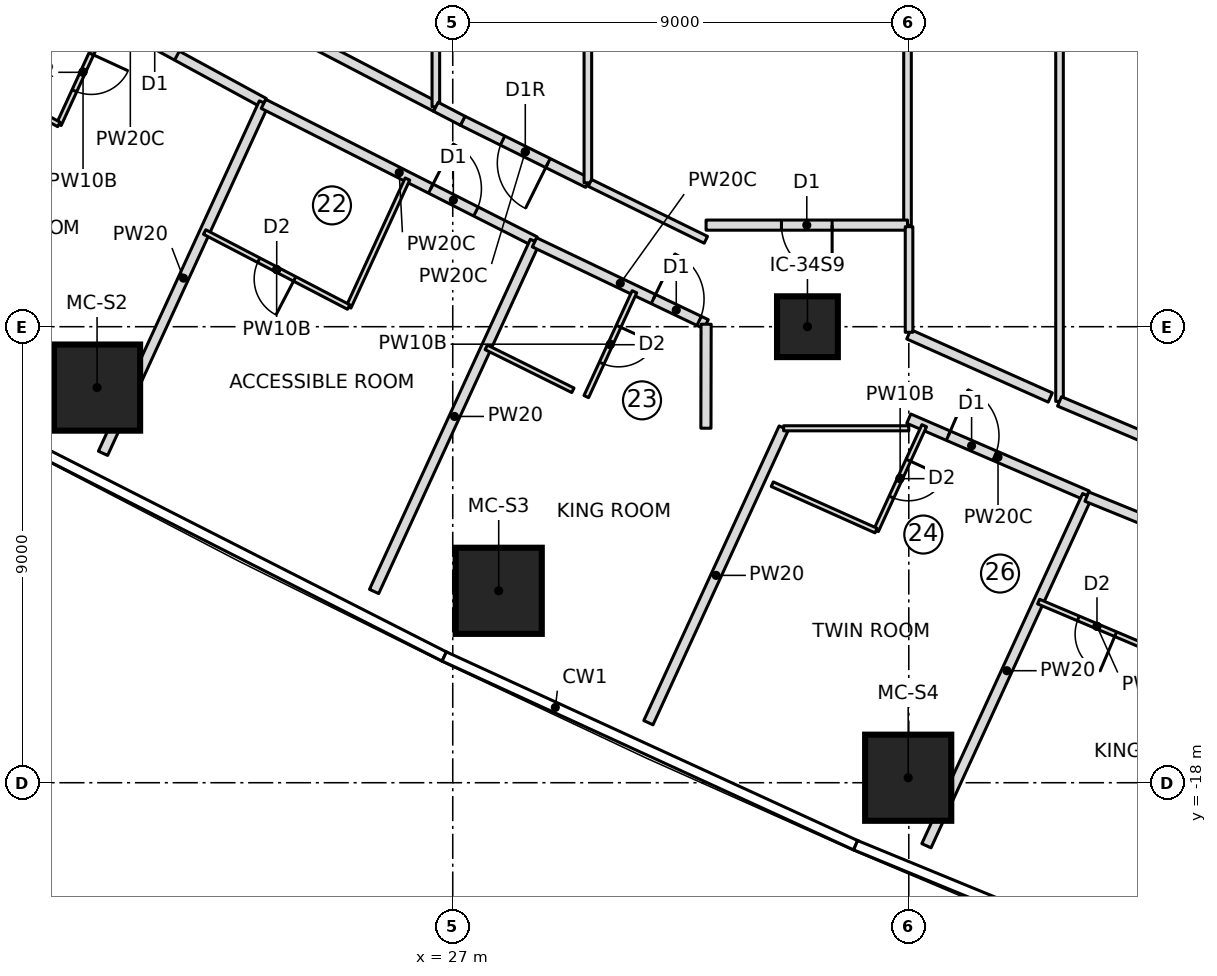
"""IFC4 building model, lengths in metres.
Left out: names, types, materials, properties, quantities, classifications, styles, units other than length and angle.
Written with IfcOpenShell. Run it as: python <this file> out.ifc"""

import sys

from ifc_helpers import new_model, si_unit, direction, frame, frame_2d, origin, origin_2d, place, context, subcontext, project, spatial, rectangle, extrude, element, fill, save


model = new_model("IFC4")
c1 = context("Model", 3, precision=1e-05, world=origin(), true_north=direction((0.0, 1.0)))
c2 = subcontext(c1, "Body", "Model", "MODEL_VIEW")
j1 = project(units=[si_unit("LENGTHUNIT", "METRE"), si_unit("PLANEANGLEUNIT", "RADIAN")], contexts=[c1])
p1 = place(None, origin())
s1 = spatial("IfcSite", under=j1, at=p1, CompositionType="ELEMENT")
p2 = place(p1, origin())
s2 = spatial("IfcBuilding", under=s1, at=p2, CompositionType="ELEMENT")
p3 = place(p2, frame((0.0, 0.0, 109.75)))
s3 = spatial("IfcBuildingStorey", under=s2, at=p3, CompositionType="ELEMENT", Elevation=109.75)
for number, where, z_axis, x_axis in (
    (1, (19.981, -10.202, 0.0), (0.0, 0.0, 1.0), (1.0, 0.0, 0.0)),
    (2, (27.907, -14.212, 0.0), (0.0, 0.0, 1.0), (1.0, 0.0, 0.0)),
    (3, (35.988, -17.902, 0.0), (0.0, 0.0, 1.0), (1.0, 0.0, 0.0)),
):
    element("IfcColumn", number, at=place(p3, frame(where, z_axis=z_axis, x_axis=x_axis)), inside=s3, PredefinedType="COLUMN", context=c2, shape_type="SweptSolid", body=[
        extrude(rectangle(XDim=1.7, YDim=1.7, at=origin_2d()), origin(), (0.0, 0.0, 1.0), 3.55),
    ])
p4 = place(p3, frame((34.0, -9.0, 0.0), z_axis=(0.0, 0.0, 1.0), x_axis=(1.0, 0.0, 0.0)))
e4 = element("IfcColumn", 4, at=p4, inside=s3, PredefinedType="COLUMN", context=c2, shape_type="SweptSolid", body=[
    extrude(rectangle(XDim=1.2, YDim=1.2, at=origin_2d()), origin(), (0.0, 0.0, 1.0), 3.55),
])
p5 = place(p3, frame((18.0, -1.715, 0.0), z_axis=(0.0, 0.0, 1.0), x_axis=(0.878415628048, -0.477897462225, 0.0)))
e5 = element("IfcWall", 5, at=p5, inside=s3, PredefinedType="PARTITIONING", context=c2, shape_type="SweptSolid", body=[
    extrude(rectangle(XDim=6.004, YDim=0.2, at=frame_2d((3.002, 0.0))), origin(), (0.0, 0.0, 1.0), 3.25),
])
p6 = place(p5, frame((3.05, 0.0, 0.0)))
e6 = element("IfcOpeningElement", 6, at=p6, cuts=e5, PredefinedType="OPENING", context=c2, shape_type="SweptSolid", body=[
    extrude(rectangle(XDim=1.0, YDim=2.1, at=frame_2d((0.5, 1.05))), frame((0.0, 0.11, 0.0), z_axis=(0.0, -1.0, 0.0), x_axis=(1.0, 0.0, 0.0)), (0.0, 0.0, 1.0), 0.22),
])
p7 = place(p3, frame((20.18, -2.934, 0.0), z_axis=(0.0, 0.0, 1.0), x_axis=(-0.417450047292, -0.908699872354, 0.0)))
e7 = element("IfcWall", 7, at=p7, inside=s3, PredefinedType="PARTITIONING", context=c2, shape_type="SweptSolid", body=[
    extrude(rectangle(XDim=2.283, YDim=0.1, at=frame_2d((1.141, 0.0))), origin(), (0.0, 0.0, 1.0), 3.25),
])
p8 = place(p7, frame((0.75, 0.0, 0.0)))
e8 = element("IfcOpeningElement", 8, at=p8, cuts=e7, PredefinedType="OPENING", context=c2, shape_type="SweptSolid", body=[
    extrude(rectangle(XDim=0.8, YDim=2.1, at=frame_2d((0.4, 1.05))), frame((0.0, 0.06, 0.0), z_axis=(0.0, -1.0, 0.0), x_axis=(1.0, 0.0, 0.0)), (0.0, 0.0, 1.0), 0.12),
])
p9 = place(p3, frame((19.228, -5.008, 0.0), z_axis=(0.0, 0.0, 1.0), x_axis=(-0.877424481957, 0.479714788663, 0.0)))
e9 = element("IfcWall", 9, at=p9, inside=s3, PredefinedType="PARTITIONING", context=c2, shape_type="SweptSolid", body=[
    extrude(rectangle(XDim=1.625, YDim=0.1, at=frame_2d((0.813, 0.0))), origin(), (0.0, 0.0, 1.0), 3.25),
])
p10 = place(p3, frame((20.098, -11.499, 0.0), z_axis=(0.0, 0.0, 1.0), x_axis=(0.417440028355, 0.908704474913, 0.0)))
e10 = element("IfcWall", 10, at=p10, inside=s3, PredefinedType="PARTITIONING", context=c2, shape_type="SweptSolid", body=[
    extrude(rectangle(XDim=7.61, YDim=0.2, at=frame_2d((3.805, 0.0))), origin(), (0.0, 0.0, 1.0), 3.25),
])
p11 = place(p3, frame((23.266, -4.602, 0.0), z_axis=(0.0, 0.0, 1.0), x_axis=(0.892007141151, -0.452021304958, 0.0)))
e11 = element("IfcWall", 11, at=p11, inside=s3, PredefinedType="PARTITIONING", context=c2, shape_type="SweptSolid", body=[
    extrude(rectangle(XDim=6.004, YDim=0.2, at=frame_2d((3.002, 0.0))), origin(), (0.0, 0.0, 1.0), 3.25),
])
p12 = place(p11, frame((3.7, 0.0, 0.0)))
e12 = element("IfcOpeningElement", 12, at=p12, cuts=e11, PredefinedType="OPENING", context=c2, shape_type="SweptSolid", body=[
    extrude(rectangle(XDim=1.0, YDim=2.1, at=frame_2d((0.5, 1.05))), frame((0.0, 0.11, 0.0), z_axis=(0.0, -1.0, 0.0), x_axis=(1.0, 0.0, 0.0)), (0.0, 0.0, 1.0), 0.22),
])
p13 = place(p3, frame((26.106, -6.085, 0.0), z_axis=(0.0, 0.0, 1.0), x_axis=(-0.417431588167, -0.908708352113, 0.0)))
e13 = element("IfcWall", 13, at=p13, inside=s3, PredefinedType="PARTITIONING", context=c2, shape_type="SweptSolid", body=[
    extrude(rectangle(XDim=2.781, YDim=0.1, at=frame_2d((1.39, 0.0))), origin(), (0.0, 0.0, 1.0), 3.25),
])
p14 = place(p3, frame((24.945, -8.612, 0.0), z_axis=(0.0, 0.0, 1.0), x_axis=(-0.886865947566, 0.46202682936, 0.0)))
e14 = element("IfcWall", 14, at=p14, inside=s3, PredefinedType="PARTITIONING", context=c2, shape_type="SweptSolid", body=[
    extrude(rectangle(XDim=3.204, YDim=0.1, at=frame_2d((1.602, 0.0))), origin(), (0.0, 0.0, 1.0), 3.25),
])
p15 = place(p14, frame((1.2, 0.0, 0.0)))
e15 = element("IfcOpeningElement", 15, at=p15, cuts=e14, PredefinedType="OPENING", context=c2, shape_type="SweptSolid", body=[
    extrude(rectangle(XDim=0.8, YDim=2.1, at=frame_2d((0.4, 1.05))), frame((0.0, 0.06, 0.0), z_axis=(0.0, -1.0, 0.0), x_axis=(1.0, 0.0, 0.0)), (0.0, 0.0, 1.0), 0.12),
])
p16 = place(p3, frame((25.448, -14.226, 0.0), z_axis=(0.0, 0.0, 1.0), x_axis=(0.417428513692, 0.908709764422, 0.0)))
e16 = element("IfcWall", 16, at=p16, inside=s3, PredefinedType="PARTITIONING", context=c2, shape_type="SweptSolid", body=[
    extrude(rectangle(XDim=7.603, YDim=0.2, at=frame_2d((3.802, 0.0))), origin(), (0.0, 0.0, 1.0), 3.25),
])
p17 = place(p3, frame((28.613, -7.335, 0.0), z_axis=(0.0, 0.0, 1.0), x_axis=(0.902499429765, -0.430691048518, 0.0)))
e17 = element("IfcWall", 17, at=p17, inside=s3, PredefinedType="PARTITIONING", context=c2, shape_type="SweptSolid", body=[
    extrude(rectangle(XDim=3.753, YDim=0.2, at=frame_2d((1.876, 0.0))), origin(), (0.0, 0.0, 1.0), 3.25),
])
p18 = place(p17, frame((2.6, 0.0, 0.0)))
e18 = element("IfcOpeningElement", 18, at=p18, cuts=e17, PredefinedType="OPENING", context=c2, shape_type="SweptSolid", body=[
    extrude(rectangle(XDim=1.0, YDim=2.1, at=frame_2d((0.5, 1.05))), frame((0.0, 0.11, 0.0), z_axis=(0.0, -1.0, 0.0), x_axis=(1.0, 0.0, 0.0)), (0.0, 0.0, 1.0), 0.22),
])
p19 = place(p3, frame((30.586, -8.31, 0.0), z_axis=(0.0, 0.0, 1.0), x_axis=(-0.417466676952, -0.908692232626, 0.0)))
e19 = element("IfcWall", 19, at=p19, inside=s3, PredefinedType="PARTITIONING", context=c2, shape_type="SweptSolid", body=[
    extrude(rectangle(XDim=2.277, YDim=0.1, at=frame_2d((1.139, 0.0))), origin(), (0.0, 0.0, 1.0), 3.25),
])
p20 = place(p19, frame((0.75, 0.0, 0.0)))
e20 = element("IfcOpeningElement", 20, at=p20, cuts=e19, PredefinedType="OPENING", context=c2, shape_type="SweptSolid", body=[
    extrude(rectangle(XDim=0.8, YDim=2.1, at=frame_2d((0.4, 1.05))), frame((0.0, 0.06, 0.0), z_axis=(0.0, -1.0, 0.0), x_axis=(1.0, 0.0, 0.0)), (0.0, 0.0, 1.0), 0.12),
])
p21 = place(p3, frame((29.371, -10.255, 0.0), z_axis=(0.0, 0.0, 1.0), x_axis=(-0.895982200486, 0.444089964324, 0.0)))
e21 = element("IfcWall", 21, at=p21, inside=s3, PredefinedType="PARTITIONING", context=c2, shape_type="SweptSolid", body=[
    extrude(rectangle(XDim=1.909, YDim=0.1, at=frame_2d((0.954, 0.0))), origin(), (0.0, 0.0, 1.0), 3.25),
])
p22 = place(p3, frame((30.861, -16.815, 0.0), z_axis=(0.0, 0.0, 1.0), x_axis=(0.417441426461, 0.908703832651, 0.0)))
e22 = element("IfcWall", 22, at=p22, inside=s3, PredefinedType="PARTITIONING", context=c2, shape_type="SweptSolid", body=[
    extrude(rectangle(XDim=6.399, YDim=0.2, at=frame_2d((3.2, 0.0))), origin(), (0.0, 0.0, 1.0), 3.25),
])
p23 = place(p3, frame((36.0, -10.815, 0.0), z_axis=(0.0, 0.0, 1.0), x_axis=(0.918174446699, -0.396176331233, 0.0)))
e23 = element("IfcWall", 23, at=p23, inside=s3, PredefinedType="PARTITIONING", context=c2, shape_type="SweptSolid", body=[
    extrude(rectangle(XDim=3.836, YDim=0.2, at=frame_2d((1.918, 0.0))), origin(), (0.0, 0.0, 1.0), 3.25),
])
p24 = place(p23, frame((0.85, 0.0, 0.0)))
e24 = element("IfcOpeningElement", 24, at=p24, cuts=e23, PredefinedType="OPENING", context=c2, shape_type="SweptSolid", body=[
    extrude(rectangle(XDim=1.0, YDim=2.1, at=frame_2d((0.5, 1.05))), frame((0.0, 0.11, 0.0), z_axis=(0.0, -1.0, 0.0), x_axis=(1.0, 0.0, 0.0)), (0.0, 0.0, 1.0), 0.22),
])
p25 = place(p3, frame((36.305, -10.954, 0.0), z_axis=(0.0, 0.0, 1.0), x_axis=(-0.41750734959, -0.908673545911, 0.0)))
e25 = element("IfcWall", 25, at=p25, inside=s3, PredefinedType="PARTITIONING", context=c2, shape_type="SweptSolid", body=[
    extrude(rectangle(XDim=2.277, YDim=0.1, at=frame_2d((1.139, 0.0))), origin(), (0.0, 0.0, 1.0), 3.25),
])
p26 = place(p25, frame((0.75, 0.0, 0.0)))
e26 = element("IfcOpeningElement", 26, at=p26, cuts=e25, PredefinedType="OPENING", context=c2, shape_type="SweptSolid", body=[
    extrude(rectangle(XDim=0.8, YDim=2.1, at=frame_2d((0.4, 1.05))), frame((0.0, 0.06, 0.0), z_axis=(0.0, -1.0, 0.0), x_axis=(1.0, 0.0, 0.0)), (0.0, 0.0, 1.0), 0.12),
])
p27 = place(p3, frame((35.354, -13.023, 0.0), z_axis=(0.0, 0.0, 1.0), x_axis=(-0.913060453705, 0.407824236504, 0.0)))
e27 = element("IfcWall", 27, at=p27, inside=s3, PredefinedType="PARTITIONING", context=c2, shape_type="SweptSolid", body=[
    extrude(rectangle(XDim=2.243, YDim=0.1, at=frame_2d((1.122, 0.0))), origin(), (0.0, 0.0, 1.0), 3.25),
])
p28 = place(p3, frame((36.348, -19.244, 0.0), z_axis=(0.0, 0.0, 1.0), x_axis=(0.417442847913, 0.908703179661, 0.0)))
e28 = element("IfcWall", 28, at=p28, inside=s3, PredefinedType="PARTITIONING", context=c2, shape_type="SweptSolid", body=[
    extrude(rectangle(XDim=7.604, YDim=0.2, at=frame_2d((3.802, 0.0))), origin(), (0.0, 0.0, 1.0), 3.25),
])
p29 = place(p3, frame((39.514, -12.353, 0.0), z_axis=(0.0, 0.0, 1.0), x_axis=(0.926327862679, -0.376718317613, 0.0)))
e29 = element("IfcWall", 29, at=p29, inside=s3, PredefinedType="PARTITIONING", context=c2, shape_type="SweptSolid", body=[
    extrude(rectangle(XDim=6.006, YDim=0.2, at=frame_2d((3.003, 0.0))), origin(), (0.0, 0.0, 1.0), 3.25),
])
p30 = place(p29, frame((3.05, 0.0, 0.0)))
e30 = element("IfcOpeningElement", 30, at=p30, cuts=e29, PredefinedType="OPENING", context=c2, shape_type="SweptSolid", body=[
    extrude(rectangle(XDim=1.0, YDim=2.1, at=frame_2d((0.5, 1.05))), frame((0.0, 0.11, 0.0), z_axis=(0.0, -1.0, 0.0), x_axis=(1.0, 0.0, 0.0)), (0.0, 0.0, 1.0), 0.22),
])
p31 = place(p3, frame((40.865, -15.4, 0.0), z_axis=(0.0, 0.0, 1.0), x_axis=(-0.921042675983, 0.38946166566, 0.0)))
e31 = element("IfcWall", 31, at=p31, inside=s3, PredefinedType="PARTITIONING", context=c2, shape_type="SweptSolid", body=[
    extrude(rectangle(XDim=2.501, YDim=0.1, at=frame_2d((1.25, 0.0))), origin(), (0.0, 0.0, 1.0), 3.25),
])
p32 = place(p31, frame((0.85, 0.0, 0.0)))
e32 = element("IfcOpeningElement", 32, at=p32, cuts=e31, PredefinedType="OPENING", context=c2, shape_type="SweptSolid", body=[
    extrude(rectangle(XDim=0.8, YDim=2.1, at=frame_2d((0.4, 1.05))), frame((0.0, 0.06, 0.0), z_axis=(0.0, -1.0, 0.0), x_axis=(1.0, 0.0, 0.0)), (0.0, 0.0, 1.0), 0.12),
])
p33 = place(p3, frame((26.667, -4.66, 0.0), z_axis=(0.0, 0.0, 1.0), x_axis=(-0.886891405098, 0.46197796004, 0.0)))
e33 = element("IfcWall", 33, at=p33, inside=s3, PredefinedType="PARTITIONING", context=c2, shape_type="SweptSolid", body=[
    extrude(rectangle(XDim=3.676, YDim=0.2, at=frame_2d((1.838, 0.0))), origin(), (0.0, 0.0, 1.0), 3.25),
])
p34 = place(p3, frame((26.667, -4.66, 0.0), z_axis=(0.0, 0.0, 1.0), x_axis=(0.0, 1.0, 0.0)))
e34 = element("IfcWall", 34, at=p34, inside=s3, PredefinedType="PARTITIONING", context=c2, shape_type="SweptSolid", body=[
    extrude(rectangle(XDim=9.32, YDim=0.15, at=frame_2d((4.66, 0.0))), origin(), (0.0, 0.0, 1.0), 3.25),
])
p35 = place(p3, frame((29.667, -6.16, 0.0), z_axis=(0.0, 0.0, 1.0), x_axis=(-0.895945057464, 0.444164895062, 0.0)))
e35 = element("IfcWall", 35, at=p35, inside=s3, PredefinedType="PARTITIONING", context=c2, shape_type="SweptSolid", body=[
    extrude(rectangle(XDim=2.757, YDim=0.2, at=frame_2d((1.378, 0.0))), origin(), (0.0, 0.0, 1.0), 3.25),
])
p36 = place(p35, frame((0.878, 0.0, 0.0)))
e36 = element("IfcOpeningElement", 36, at=p36, cuts=e35, PredefinedType="OPENING", context=c2, shape_type="SweptSolid", body=[
    extrude(rectangle(XDim=1.0, YDim=2.1, at=frame_2d((0.5, 1.05))), frame((0.0, 0.11, 0.0), z_axis=(0.0, -1.0, 0.0), x_axis=(1.0, 0.0, 0.0)), (0.0, 0.0, 1.0), 0.22),
])
p37 = place(p3, frame((29.667, -6.16, 0.0), z_axis=(0.0, 0.0, 1.0), x_axis=(0.0, 1.0, 0.0)))
e37 = element("IfcWall", 37, at=p37, inside=s3, PredefinedType="PARTITIONING", context=c2, shape_type="SweptSolid", body=[
    extrude(rectangle(XDim=12.321, YDim=0.15, at=frame_2d((6.16, 0.0))), origin(), (0.0, 0.0, 1.0), 3.25),
])
p38 = place(p3, frame((35.975, -7.0, 0.0), z_axis=(0.0, 0.0, 1.0), x_axis=(0.0, 1.0, 0.0)))
e38 = element("IfcWall", 38, at=p38, inside=s3, PredefinedType="PARTITIONING", context=c2, shape_type="SweptSolid", body=[
    extrude(rectangle(XDim=14.0, YDim=0.15, at=frame_2d((7.0, 0.0))), origin(), (0.0, 0.0, 1.0), 3.25),
])
p39 = place(p3, frame((38.792, -10.397, 0.0), z_axis=(0.0, 0.0, 1.0), x_axis=(-0.913029587861, 0.407893333716, 0.0)))
e39 = element("IfcWall", 39, at=p39, inside=s3, PredefinedType="PARTITIONING", context=c2, shape_type="SweptSolid", body=[
    extrude(rectangle(XDim=3.058, YDim=0.2, at=frame_2d((1.529, 0.0))), origin(), (0.0, 0.0, 1.0), 3.25),
])
p40 = place(p3, frame((38.975, -10.474, 0.0), z_axis=(0.0, 0.0, 1.0), x_axis=(0.0, 1.0, 0.0)))
e40 = element("IfcWall", 40, at=p40, inside=s3, PredefinedType="PARTITIONING", context=c2, shape_type="SweptSolid", body=[
    extrude(rectangle(XDim=20.949, YDim=0.15, at=frame_2d((10.474, 0.0))), origin(), (0.0, 0.0, 1.0), 3.25),
])
p41 = place(p3, frame((42.728, -12.062, 0.0), z_axis=(0.0, 0.0, 1.0), x_axis=(-0.921030909625, 0.389489490891, 0.0)))
e41 = element("IfcWall", 41, at=p41, inside=s3, PredefinedType="PARTITIONING", context=c2, shape_type="SweptSolid", body=[
    extrude(rectangle(XDim=4.075, YDim=0.2, at=frame_2d((2.038, 0.0))), origin(), (0.0, 0.0, 1.0), 3.25),
])
p42 = place(p3, frame((35.975, -6.995, 0.0), z_axis=(0.0, 0.0, 1.0), x_axis=(-1.0, 0.0, 0.0)))
e42 = element("IfcWall", 42, at=p42, inside=s3, PredefinedType="PARTITIONING", context=c2, shape_type="SweptSolid", body=[
    extrude(rectangle(XDim=3.975, YDim=0.2, at=frame_2d((1.988, 0.0))), origin(), (0.0, 0.0, 1.0), 3.25),
])
p43 = place(p42, frame((1.488, 0.0, 0.0)))
e43 = element("IfcOpeningElement", 43, at=p43, cuts=e42, PredefinedType="OPENING", context=c2, shape_type="SweptSolid", body=[
    extrude(rectangle(XDim=1.0, YDim=2.1, at=frame_2d((0.5, 1.05))), frame((0.0, 0.11, 0.0), z_axis=(0.0, -1.0, 0.0), x_axis=(1.0, 0.0, 0.0)), (0.0, 0.0, 1.0), 0.22),
])
p44 = place(p3, frame((33.53, -11.005, 0.0), z_axis=(0.0, 0.0, 1.0), x_axis=(1.0, 0.0, 0.0)))
e44 = element("IfcWall", 44, at=p44, inside=s3, PredefinedType="PARTITIONING", context=c2, shape_type="SweptSolid", body=[
    extrude(rectangle(XDim=2.47, YDim=0.1, at=frame_2d((1.235, 0.0))), origin(), (0.0, 0.0, 1.0), 3.25),
])
p45 = place(p3, frame((31.995, -7.285, 0.0), z_axis=(0.0, 0.0, 1.0), x_axis=(-0.89773510237, 0.440535680702, 0.0)))
e45 = element("IfcWall", 45, at=p45, inside=s3, PredefinedType="PARTITIONING", context=c2, shape_type="SweptSolid", body=[
    extrude(rectangle(XDim=2.549, YDim=0.15, at=frame_2d((1.275, 0.0))), origin(), (0.0, 0.0, 1.0), 3.25),
])
p46 = place(p3, frame((36.005, -9.11, 0.0), z_axis=(0.0, 0.0, 1.0), x_axis=(0.0, 1.0, 0.0)))
e46 = element("IfcWall", 46, at=p46, inside=s3, PredefinedType="PARTITIONING", context=c2, shape_type="SweptSolid", body=[
    extrude(rectangle(XDim=2.084, YDim=0.15, at=frame_2d((1.042, 0.0))), origin(), (0.0, 0.0, 1.0), 3.25),
])
p47 = place(p3, frame((32.0, -8.951, 0.0), z_axis=(0.0, 0.0, 1.0), x_axis=(-0.001665276625, -0.999998613426, 0.0)))
e47 = element("IfcWall", 47, at=p47, inside=s3, PredefinedType="PARTITIONING", context=c2, shape_type="SweptSolid", body=[
    extrude(rectangle(XDim=2.052, YDim=0.2, at=frame_2d((1.026, 0.0))), origin(), (0.0, 0.0, 1.0), 3.25),
])
p48 = place(p3, frame((27.196, -4.936, 0.0), z_axis=(0.0, 0.0, 1.0), x_axis=(-0.886948968309, 0.46186743511, 0.0)))
e48 = element("IfcWall", 48, at=p48, inside=s3, PredefinedType="PARTITIONING", context=c2, shape_type="SweptSolid", body=[
    extrude(rectangle(XDim=0.597, YDim=0.2, at=frame_2d((0.299, 0.0))), origin(), (0.0, 0.0, 1.0), 3.25),
])
p49 = place(p8, origin())
e49 = element("IfcDoor", 49, at=p49, inside=s3, OperationType="SINGLE_SWING_LEFT", PredefinedType="DOOR", context=c2, shape_type="SweptSolid", body=[
    extrude(rectangle(XDim=0.8, YDim=2.1, at=frame_2d((0.4, 1.05))), frame((0.0, 0.025, 0.0), z_axis=(0.0, -1.0, 0.0), x_axis=(1.0, 0.0, 0.0)), (0.0, 0.0, 1.0), 0.05),
])
fill(e8, e49)
p50 = place(p6, origin())
e50 = element("IfcDoor", 50, at=p50, inside=s3, OperationType="SINGLE_SWING_LEFT", PredefinedType="DOOR", context=c2, shape_type="SweptSolid", body=[
    extrude(rectangle(XDim=1.0, YDim=2.1, at=frame_2d((0.5, 1.05))), frame((0.0, 0.025, 0.0), z_axis=(0.0, -1.0, 0.0), x_axis=(1.0, 0.0, 0.0)), (0.0, 0.0, 1.0), 0.05),
])
fill(e6, e50)
p51 = place(p15, origin())
e51 = element("IfcDoor", 51, at=p51, inside=s3, OperationType="SINGLE_SWING_LEFT", PredefinedType="DOOR", context=c2, shape_type="SweptSolid", body=[
    extrude(rectangle(XDim=0.8, YDim=2.1, at=frame_2d((0.4, 1.05))), frame((0.0, 0.025, 0.0), z_axis=(0.0, -1.0, 0.0), x_axis=(1.0, 0.0, 0.0)), (0.0, 0.0, 1.0), 0.05),
])
fill(e15, e51)
p52 = place(p12, origin())
e52 = element("IfcDoor", 52, at=p52, inside=s3, OperationType="SINGLE_SWING_LEFT", PredefinedType="DOOR", context=c2, shape_type="SweptSolid", body=[
    extrude(rectangle(XDim=1.0, YDim=2.1, at=frame_2d((0.5, 1.05))), frame((0.0, 0.025, 0.0), z_axis=(0.0, -1.0, 0.0), x_axis=(1.0, 0.0, 0.0)), (0.0, 0.0, 1.0), 0.05),
])
fill(e12, e52)
p53 = place(p20, origin())
e53 = element("IfcDoor", 53, at=p53, inside=s3, OperationType="SINGLE_SWING_LEFT", PredefinedType="DOOR", context=c2, shape_type="SweptSolid", body=[
    extrude(rectangle(XDim=0.8, YDim=2.1, at=frame_2d((0.4, 1.05))), frame((0.0, 0.025, 0.0), z_axis=(0.0, -1.0, 0.0), x_axis=(1.0, 0.0, 0.0)), (0.0, 0.0, 1.0), 0.05),
])
fill(e20, e53)
p54 = place(p18, origin())
e54 = element("IfcDoor", 54, at=p54, inside=s3, OperationType="SINGLE_SWING_LEFT", PredefinedType="DOOR", context=c2, shape_type="SweptSolid", body=[
    extrude(rectangle(XDim=1.0, YDim=2.1, at=frame_2d((0.5, 1.05))), frame((0.0, 0.025, 0.0), z_axis=(0.0, -1.0, 0.0), x_axis=(1.0, 0.0, 0.0)), (0.0, 0.0, 1.0), 0.05),
])
fill(e18, e54)
p55 = place(p26, origin())
e55 = element("IfcDoor", 55, at=p55, inside=s3, OperationType="SINGLE_SWING_LEFT", PredefinedType="DOOR", context=c2, shape_type="SweptSolid", body=[
    extrude(rectangle(XDim=0.8, YDim=2.1, at=frame_2d((0.4, 1.05))), frame((0.0, 0.025, 0.0), z_axis=(0.0, -1.0, 0.0), x_axis=(1.0, 0.0, 0.0)), (0.0, 0.0, 1.0), 0.05),
])
fill(e26, e55)
p56 = place(p24, origin())
e56 = element("IfcDoor", 56, at=p56, inside=s3, OperationType="SINGLE_SWING_LEFT", PredefinedType="DOOR", context=c2, shape_type="SweptSolid", body=[
    extrude(rectangle(XDim=1.0, YDim=2.1, at=frame_2d((0.5, 1.05))), frame((0.0, 0.025, 0.0), z_axis=(0.0, -1.0, 0.0), x_axis=(1.0, 0.0, 0.0)), (0.0, 0.0, 1.0), 0.05),
])
fill(e24, e56)
p57 = place(p32, origin())
e57 = element("IfcDoor", 57, at=p57, inside=s3, OperationType="SINGLE_SWING_LEFT", PredefinedType="DOOR", context=c2, shape_type="SweptSolid", body=[
    extrude(rectangle(XDim=0.8, YDim=2.1, at=frame_2d((0.4, 1.05))), frame((0.0, 0.025, 0.0), z_axis=(0.0, -1.0, 0.0), x_axis=(1.0, 0.0, 0.0)), (0.0, 0.0, 1.0), 0.05),
])
fill(e32, e57)
p58 = place(p36, origin())
e58 = element("IfcDoor", 58, at=p58, inside=s3, OperationType="SINGLE_SWING_RIGHT", PredefinedType="DOOR", context=c2, shape_type="SweptSolid", body=[
    extrude(rectangle(XDim=1.0, YDim=2.1, at=frame_2d((0.5, 1.05))), frame((0.0, 0.025, 0.0), z_axis=(0.0, -1.0, 0.0), x_axis=(1.0, 0.0, 0.0)), (0.0, 0.0, 1.0), 0.05),
])
fill(e36, e58)
p59 = place(p43, origin())
e59 = element("IfcDoor", 59, at=p59, inside=s3, OperationType="SINGLE_SWING_LEFT", PredefinedType="DOOR", context=c2, shape_type="SweptSolid", body=[
    extrude(rectangle(XDim=1.0, YDim=2.1, at=frame_2d((0.5, 1.05))), frame((0.0, 0.025, 0.0), z_axis=(0.0, -1.0, 0.0), x_axis=(1.0, 0.0, 0.0)), (0.0, 0.0, 1.0), 0.05),
])
fill(e43, e59)
save(model, sys.argv[1])
